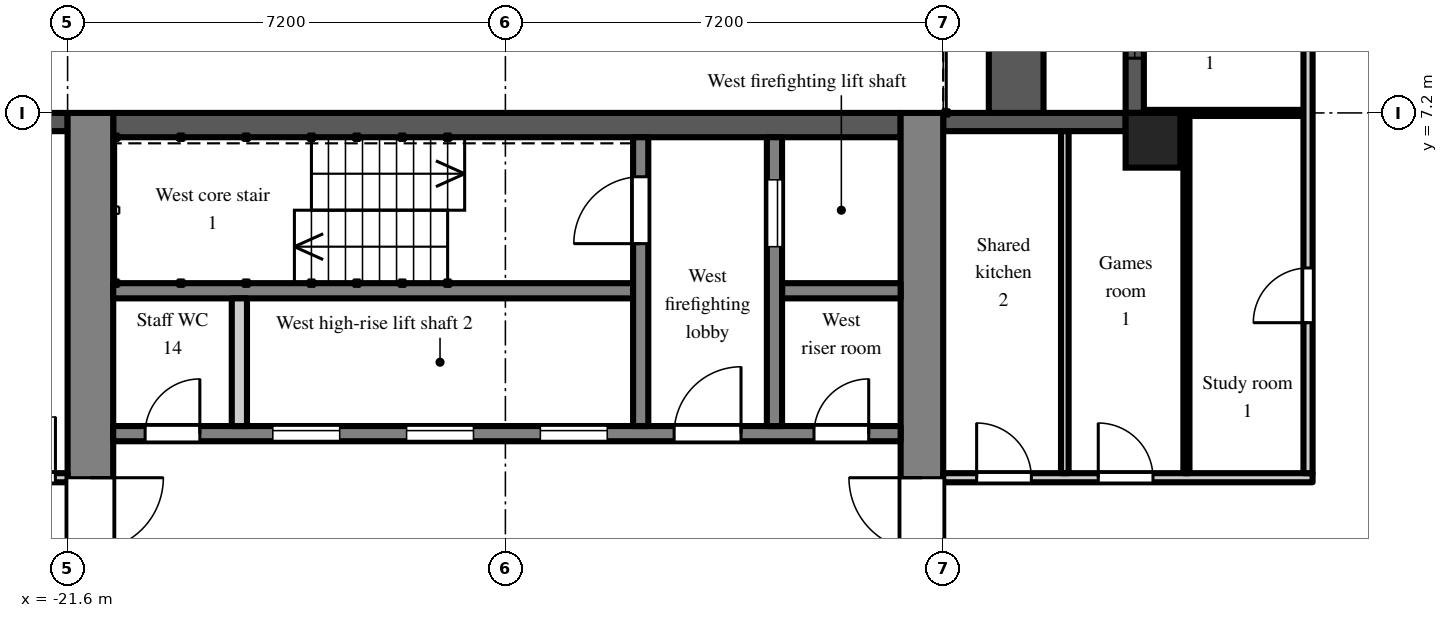
"""IFC4 building model, lengths in metres.
Left out: names, types, materials, properties, quantities, classifications, styles, units other than length and angle.
Written with IfcOpenShell. Run it as: python <this file> out.ifc"""

import sys

from ifc_helpers import new_model, si_unit, direction, frame, frame_2d, origin, origin_2d, place, context, subcontext, project, spatial, rectangle, extrude, element, fill, save


model = new_model("IFC4")
c1 = context("Model", 3, precision=1e-05, world=origin(), true_north=direction((0.0, 1.0)))
c2 = subcontext(c1, "Body", "Model", "MODEL_VIEW")
j1 = project(units=[si_unit("LENGTHUNIT", "METRE"), si_unit("PLANEANGLEUNIT", "RADIAN")], contexts=[c1])
p1 = place(None, origin())
s1 = spatial("IfcSite", under=j1, at=p1, CompositionType="ELEMENT")
p2 = place(p1, origin())
s2 = spatial("IfcBuilding", under=s1, at=p2, CompositionType="ELEMENT")
p3 = place(p2, frame((0.0, 0.0, 201.9)))
s3 = spatial("IfcBuildingStorey", under=s2, at=p3, CompositionType="ELEMENT", Elevation=201.9)
p4 = place(p3, frame((-3.75, 6.75, 0.0), z_axis=(0.0, 0.0, 1.0), x_axis=(1.0, 0.0, 0.0)))
e1 = element("IfcColumn", 1, at=p4, inside=s3, PredefinedType="COLUMN", context=c2, shape_type="SweptSolid", body=[
    extrude(rectangle(XDim=0.9, YDim=0.9, at=origin_2d()), origin(), (0.0, 0.0, 1.0), 3.0),
])
p5 = place(p3, frame((-4.05, 14.4, 0.0), z_axis=(0.0, 0.0, 1.0), x_axis=(0.0, -1.0, 0.0)))
e2 = element("IfcWall", 2, at=p5, inside=s3, PredefinedType="SOLIDWALL", context=c2, shape_type="SweptSolid", body=[
    extrude(rectangle(XDim=7.2, YDim=0.3, at=frame_2d((3.6, 0.0))), origin(), (0.0, 0.0, 1.0), 2.3),
])
p6 = place(p5, frame((3.0, 0.0, 0.0)))
e3 = element("IfcOpeningElement", 3, at=p6, cuts=e2, PredefinedType="OPENING", context=c2, shape_type="SweptSolid", body=[
    extrude(rectangle(XDim=1.2, YDim=2.05, at=frame_2d((0.6, 1.025))), frame((0.0, 0.16, 0.0), z_axis=(0.0, -1.0, 0.0), x_axis=(1.0, 0.0, 0.0)), (0.0, 0.0, 1.0), 0.32),
])
p7 = place(p5, frame((0.9, 0.0, 0.2)))
e4 = element("IfcOpeningElement", 4, at=p7, cuts=e2, PredefinedType="OPENING", context=c2, shape_type="SweptSolid", body=[
    extrude(rectangle(XDim=1.8, YDim=1.85, at=frame_2d((0.9, 0.925))), frame((0.0, 0.16, 0.0), z_axis=(0.0, -1.0, 0.0), x_axis=(1.0, 0.0, 0.0)), (0.0, 0.0, 1.0), 0.32),
])
p8 = place(p5, frame((4.5, 0.0, 0.2)))
e5 = element("IfcOpeningElement", 5, at=p8, cuts=e2, PredefinedType="OPENING", context=c2, shape_type="SweptSolid", body=[
    extrude(rectangle(XDim=1.8, YDim=1.85, at=frame_2d((0.9, 0.925))), frame((0.0, 0.16, 0.0), z_axis=(0.0, -1.0, 0.0), x_axis=(1.0, 0.0, 0.0)), (0.0, 0.0, 1.0), 0.32),
])
p9 = place(p3, frame((-4.2, 7.05, 0.0), z_axis=(0.0, 0.0, 1.0), x_axis=(-1.0, 0.0, 0.0)))
e6 = element("IfcWall", 6, at=p9, inside=s3, PredefinedType="SOLIDWALL", context=c2, shape_type="SweptSolid", body=[
    extrude(rectangle(XDim=3.0, YDim=0.3, at=frame_2d((1.5, 0.0))), origin(), (0.0, 0.0, 1.0), 2.3),
])
p10 = place(p3, frame((-21.6, 7.05, 0.0), z_axis=(0.0, 0.0, 1.0), x_axis=(-1.0, 0.0, 0.0)))
e7 = element("IfcWall", 7, at=p10, inside=s3, PredefinedType="SOLIDWALL", context=c2, shape_type="SweptSolid", body=[
    extrude(rectangle(XDim=2.7, YDim=0.3, at=frame_2d((1.35, 0.0))), origin(), (0.0, 0.0, 1.0), 2.3),
])
p11 = place(p10, frame((0.75, 0.0, 0.2)))
e8 = element("IfcOpeningElement", 8, at=p11, cuts=e7, PredefinedType="OPENING", context=c2, shape_type="SweptSolid", body=[
    extrude(rectangle(XDim=1.2, YDim=1.85, at=frame_2d((0.6, 0.925))), frame((0.0, 0.16, 0.0), z_axis=(0.0, -1.0, 0.0), x_axis=(1.0, 0.0, 0.0)), (0.0, 0.0, 1.0), 0.32),
])
p12 = place(p3, frame((-6.0, 7.2, 0.0), z_axis=(0.0, 0.0, 1.0), x_axis=(0.0, 1.0, 0.0)))
e9 = element("IfcWall", 9, at=p12, inside=s3, PredefinedType="PARAPET", context=c2, shape_type="SweptSolid", body=[
    extrude(rectangle(XDim=7.2, YDim=0.9, at=frame_2d((3.6, 0.0))), origin(), (0.0, 0.0, 1.0), 0.8),
])
p13 = place(p3, frame((-7.55, -7.2, 0.0), z_axis=(0.0, 0.0, 1.0), x_axis=(0.0, 1.0, 0.0)))
e10 = element("IfcWall", 10, at=p13, inside=s3, PredefinedType="SHEAR", context=c2, shape_type="SweptSolid", body=[
    extrude(rectangle(XDim=14.4, YDim=0.7, at=frame_2d((7.2, 0.0))), origin(), (0.0, 0.0, 1.0), 2.6),
])
p14 = place(p13, frame((6.0, 0.0, 0.0)))
e11 = element("IfcOpeningElement", 11, at=p14, cuts=e10, PredefinedType="OPENING", context=c2, shape_type="SweptSolid", body=[
    extrude(rectangle(XDim=2.4, YDim=2.2, at=frame_2d((1.2, 1.1))), frame((0.0, 0.36, 0.0), z_axis=(0.0, -1.0, 0.0), x_axis=(1.0, 0.0, 0.0)), (0.0, 0.0, 1.0), 0.72),
])
p15 = place(p3, frame((-21.225, -7.2, 0.0), z_axis=(0.0, 0.0, 1.0), x_axis=(0.0, 1.0, 0.0)))
e12 = element("IfcWall", 12, at=p15, inside=s3, PredefinedType="SHEAR", context=c2, shape_type="SweptSolid", body=[
    extrude(rectangle(XDim=14.4, YDim=0.75, at=frame_2d((7.2, 0.0))), origin(), (0.0, 0.0, 1.0), 2.6),
])
p16 = place(p15, frame((6.0, 0.0, 0.0)))
e13 = element("IfcOpeningElement", 13, at=p16, cuts=e12, PredefinedType="OPENING", context=c2, shape_type="SweptSolid", body=[
    extrude(rectangle(XDim=2.4, YDim=2.2, at=frame_2d((1.2, 1.1))), frame((0.0, 0.385, 0.0), z_axis=(0.0, -1.0, 0.0), x_axis=(1.0, 0.0, 0.0)), (0.0, 0.0, 1.0), 0.77),
])
p17 = place(p3, frame((-7.9, 7.0, 0.0), z_axis=(0.0, 0.0, 1.0), x_axis=(-1.0, 0.0, 0.0)))
e14 = element("IfcWall", 14, at=p17, inside=s3, PredefinedType="SHEAR", context=c2, shape_type="SweptSolid", body=[
    extrude(rectangle(XDim=12.95, YDim=0.4, at=frame_2d((6.475, 0.0))), origin(), (0.0, 0.0, 1.0), 2.6),
])
p18 = place(p3, frame((-7.9, 1.925, 0.0), z_axis=(0.0, 0.0, 1.0), x_axis=(-1.0, 0.0, 0.0)))
e15 = element("IfcWall", 15, at=p18, inside=s3, PredefinedType="SHEAR", context=c2, shape_type="SweptSolid", body=[
    extrude(rectangle(XDim=12.95, YDim=0.25, at=frame_2d((6.475, 0.0))), origin(), (0.0, 0.0, 1.0), 2.6),
])
p19 = place(p18, frame((4.825, 0.0, 0.0)))
e16 = element("IfcOpeningElement", 16, at=p19, cuts=e15, PredefinedType="OPENING", context=c2, shape_type="SweptSolid", body=[
    extrude(rectangle(XDim=1.1, YDim=2.1, at=frame_2d((0.55, 1.05))), frame((0.0, 0.135, 0.0), z_axis=(0.0, -1.0, 0.0), x_axis=(1.0, 0.0, 0.0)), (0.0, 0.0, 1.0), 0.27),
])
p20 = place(p18, frame((7.025, 0.0, 0.0)))
e17 = element("IfcOpeningElement", 17, at=p20, cuts=e15, PredefinedType="OPENING", context=c2, shape_type="SweptSolid", body=[
    extrude(rectangle(XDim=1.1, YDim=2.1, at=frame_2d((0.55, 1.05))), frame((0.0, 0.135, 0.0), z_axis=(0.0, -1.0, 0.0), x_axis=(1.0, 0.0, 0.0)), (0.0, 0.0, 1.0), 0.27),
])
p21 = place(p18, frame((9.225, 0.0, 0.0)))
e18 = element("IfcOpeningElement", 18, at=p21, cuts=e15, PredefinedType="OPENING", context=c2, shape_type="SweptSolid", body=[
    extrude(rectangle(XDim=1.1, YDim=2.1, at=frame_2d((0.55, 1.05))), frame((0.0, 0.135, 0.0), z_axis=(0.0, -1.0, 0.0), x_axis=(1.0, 0.0, 0.0)), (0.0, 0.0, 1.0), 0.27),
])
p22 = place(p18, frame((0.525, 0.0, 0.0)))
e19 = element("IfcOpeningElement", 19, at=p22, cuts=e15, PredefinedType="OPENING", context=c2, shape_type="SweptSolid", body=[
    extrude(rectangle(XDim=0.9, YDim=2.1, at=frame_2d((0.45, 1.05))), frame((0.0, 0.135, 0.0), z_axis=(0.0, -1.0, 0.0), x_axis=(1.0, 0.0, 0.0)), (0.0, 0.0, 1.0), 0.27),
])
p23 = place(p18, frame((2.625, 0.0, 0.0)))
e20 = element("IfcOpeningElement", 20, at=p23, cuts=e15, PredefinedType="OPENING", context=c2, shape_type="SweptSolid", body=[
    extrude(rectangle(XDim=1.1, YDim=2.1, at=frame_2d((0.55, 1.05))), frame((0.0, 0.135, 0.0), z_axis=(0.0, -1.0, 0.0), x_axis=(1.0, 0.0, 0.0)), (0.0, 0.0, 1.0), 0.27),
])
p24 = place(p18, frame((11.525, 0.0, 0.0)))
e21 = element("IfcOpeningElement", 21, at=p24, cuts=e15, PredefinedType="OPENING", context=c2, shape_type="SweptSolid", body=[
    extrude(rectangle(XDim=0.9, YDim=2.1, at=frame_2d((0.45, 1.05))), frame((0.0, 0.135, 0.0), z_axis=(0.0, -1.0, 0.0), x_axis=(1.0, 0.0, 0.0)), (0.0, 0.0, 1.0), 0.27),
])
p25 = place(p3, frame((-7.9, 4.275, 0.0), z_axis=(0.0, 0.0, 1.0), x_axis=(-1.0, 0.0, 0.0)))
e22 = element("IfcWall", 22, at=p25, inside=s3, PredefinedType="SHEAR", context=c2, shape_type="SweptSolid", body=[
    extrude(rectangle(XDim=1.95, YDim=0.25, at=frame_2d((0.975, 0.0))), origin(), (0.0, 0.0, 1.0), 2.6),
])
p26 = place(p3, frame((-12.3, 4.275, 0.0), z_axis=(0.0, 0.0, 1.0), x_axis=(-1.0, 0.0, 0.0)))
e23 = element("IfcWall", 23, at=p26, inside=s3, PredefinedType="SHEAR", context=c2, shape_type="SweptSolid", body=[
    extrude(rectangle(XDim=8.55, YDim=0.25, at=frame_2d((4.275, 0.0))), origin(), (0.0, 0.0, 1.0), 2.6),
])
p27 = place(p3, frame((-9.975, 2.05, 0.0), z_axis=(0.0, 0.0, 1.0), x_axis=(0.0, 1.0, 0.0)))
e24 = element("IfcWall", 24, at=p27, inside=s3, PredefinedType="SHEAR", context=c2, shape_type="SweptSolid", body=[
    extrude(rectangle(XDim=4.75, YDim=0.25, at=frame_2d((2.375, 0.0))), origin(), (0.0, 0.0, 1.0), 2.6),
])
p28 = place(p27, frame((2.95, 0.0, 0.0)))
e25 = element("IfcOpeningElement", 25, at=p28, cuts=e24, PredefinedType="OPENING", context=c2, shape_type="SweptSolid", body=[
    extrude(rectangle(XDim=1.1, YDim=2.1, at=frame_2d((0.55, 1.05))), frame((0.0, 0.135, 0.0), z_axis=(0.0, -1.0, 0.0), x_axis=(1.0, 0.0, 0.0)), (0.0, 0.0, 1.0), 0.27),
])
p29 = place(p3, frame((-12.175, 2.05, 0.0), z_axis=(0.0, 0.0, 1.0), x_axis=(0.0, 1.0, 0.0)))
e26 = element("IfcWall", 26, at=p29, inside=s3, PredefinedType="SHEAR", context=c2, shape_type="SweptSolid", body=[
    extrude(rectangle(XDim=4.75, YDim=0.25, at=frame_2d((2.375, 0.0))), origin(), (0.0, 0.0, 1.0), 2.6),
])
p30 = place(p29, frame((3.0, 0.0, 0.0)))
e27 = element("IfcOpeningElement", 27, at=p30, cuts=e26, PredefinedType="OPENING", context=c2, shape_type="SweptSolid", body=[
    extrude(rectangle(XDim=1.1, YDim=2.1, at=frame_2d((0.55, 1.05))), frame((0.0, 0.135, 0.0), z_axis=(0.0, -1.0, 0.0), x_axis=(1.0, 0.0, 0.0)), (0.0, 0.0, 1.0), 0.27),
])
p31 = place(p3, frame((-18.775, 2.05, 0.0), z_axis=(0.0, 0.0, 1.0), x_axis=(0.0, 1.0, 0.0)))
e28 = element("IfcWall", 28, at=p31, inside=s3, PredefinedType="PARTITIONING", context=c2, shape_type="SweptSolid", body=[
    extrude(rectangle(XDim=2.1, YDim=0.25, at=frame_2d((1.05, 0.0))), origin(), (0.0, 0.0, 1.0), 2.6),
])
p32 = place(p3, frame((-25.125, 1.2, 0.0), z_axis=(0.0, 0.0, 1.0), x_axis=(1.0, 0.0, 0.0)))
e29 = element("IfcWall", 29, at=p32, inside=s3, PredefinedType="PARTITIONING", context=c2, shape_type="SweptSolid", body=[
    extrude(rectangle(XDim=3.525, YDim=0.15, at=frame_2d((1.762, 0.0))), origin(), (0.0, 0.0, 1.0), 2.6),
])
p33 = place(p32, frame((2.325, 0.0, 0.0)))
e30 = element("IfcOpeningElement", 30, at=p33, cuts=e29, PredefinedType="OPENING", context=c2, shape_type="SweptSolid", body=[
    extrude(rectangle(XDim=1.0, YDim=2.1, at=frame_2d((0.5, 1.05))), frame((0.0, 0.085, 0.0), z_axis=(0.0, -1.0, 0.0), x_axis=(1.0, 0.0, 0.0)), (0.0, 0.0, 1.0), 0.17),
])
p34 = place(p3, frame((-7.2, 1.2, 0.0), z_axis=(0.0, 0.0, 1.0), x_axis=(1.0, 0.0, 0.0)))
e31 = element("IfcWall", 31, at=p34, inside=s3, PredefinedType="PARTITIONING", context=c2, shape_type="SweptSolid", body=[
    extrude(rectangle(XDim=6.075, YDim=0.15, at=frame_2d((3.038, 0.0))), origin(), (0.0, 0.0, 1.0), 2.6),
])
p35 = place(p34, frame((2.55, 0.0, 0.0)))
e32 = element("IfcOpeningElement", 32, at=p35, cuts=e31, PredefinedType="OPENING", context=c2, shape_type="SweptSolid", body=[
    extrude(rectangle(XDim=0.9, YDim=2.1, at=frame_2d((0.45, 1.05))), frame((0.0, 0.085, 0.0), z_axis=(0.0, -1.0, 0.0), x_axis=(1.0, 0.0, 0.0)), (0.0, 0.0, 1.0), 0.17),
])
p36 = place(p34, frame((0.55, 0.0, 0.0)))
e33 = element("IfcOpeningElement", 33, at=p36, cuts=e31, PredefinedType="OPENING", context=c2, shape_type="SweptSolid", body=[
    extrude(rectangle(XDim=0.9, YDim=2.1, at=frame_2d((0.45, 1.05))), frame((0.0, 0.085, 0.0), z_axis=(0.0, -1.0, 0.0), x_axis=(1.0, 0.0, 0.0)), (0.0, 0.0, 1.0), 0.17),
])
p37 = place(p3, frame((-5.2, 1.275, 0.0), z_axis=(0.0, 0.0, 1.0), x_axis=(0.0, 1.0, 0.0)))
e34 = element("IfcWall", 34, at=p37, inside=s3, PredefinedType="PARTITIONING", context=c2, shape_type="SweptSolid", body=[
    extrude(rectangle(XDim=5.625, YDim=0.125, at=frame_2d((2.812, 0.0))), origin(), (0.0, 0.0, 1.0), 2.6),
])
p38 = place(p3, frame((-3.9, 7.2, 0.0), z_axis=(0.0, 0.0, 1.0), x_axis=(1.0, 0.0, 0.0)))
e35 = element("IfcWall", 35, at=p38, inside=s3, PredefinedType="PARTITIONING", context=c2, shape_type="SweptSolid", body=[
    extrude(rectangle(XDim=2.625, YDim=0.1, at=frame_2d((1.312, 0.0))), origin(), (0.0, 0.0, 1.0), 2.6),
])
p39 = place(p3, frame((-3.2, 1.275, 0.0), z_axis=(0.0, 0.0, 1.0), x_axis=(0.0, 1.0, 0.0)))
e36 = element("IfcWall", 36, at=p39, inside=s3, PredefinedType="PARTITIONING", context=c2, shape_type="SweptSolid", body=[
    extrude(rectangle(XDim=5.875, YDim=0.1, at=frame_2d((2.938, 0.0))), origin(), (0.0, 0.0, 1.0), 2.6),
])
p40 = place(p3, frame((-1.2, 1.275, 0.0), z_axis=(0.0, 0.0, 1.0), x_axis=(0.0, 1.0, 0.0)))
e37 = element("IfcWall", 37, at=p40, inside=s3, PredefinedType="PARTITIONING", context=c2, shape_type="SweptSolid", body=[
    extrude(rectangle(XDim=16.65, YDim=0.15, at=frame_2d((8.325, 0.0))), origin(), (0.0, 0.0, 1.0), 2.6),
])
p41 = place(p40, frame((2.475, 0.0, 0.0)))
e38 = element("IfcOpeningElement", 38, at=p41, cuts=e37, PredefinedType="OPENING", context=c2, shape_type="SweptSolid", body=[
    extrude(rectangle(XDim=0.9, YDim=2.1, at=frame_2d((0.45, 1.05))), frame((0.0, 0.085, 0.0), z_axis=(0.0, -1.0, 0.0), x_axis=(1.0, 0.0, 0.0)), (0.0, 0.0, 1.0), 0.17),
])
p42 = place(p40, frame((10.875, 0.0, 0.0)))
e39 = element("IfcOpeningElement", 39, at=p42, cuts=e37, PredefinedType="OPENING", context=c2, shape_type="SweptSolid", body=[
    extrude(rectangle(XDim=0.9, YDim=2.1, at=frame_2d((0.45, 1.05))), frame((0.0, 0.085, 0.0), z_axis=(0.0, -1.0, 0.0), x_axis=(1.0, 0.0, 0.0)), (0.0, 0.0, 1.0), 0.17),
])
p43 = place(p40, frame((13.725, 0.0, 0.0)))
e40 = element("IfcOpeningElement", 40, at=p43, cuts=e37, PredefinedType="OPENING", context=c2, shape_type="SweptSolid", body=[
    extrude(rectangle(XDim=1.0, YDim=2.1, at=frame_2d((0.5, 1.05))), frame((0.0, 0.085, 0.0), z_axis=(0.0, -1.0, 0.0), x_axis=(1.0, 0.0, 0.0)), (0.0, 0.0, 1.0), 0.17),
])
p44 = place(p8, origin())
e41 = element("IfcWindow", 41, at=p44, inside=s3, PartitioningType="SINGLE_PANEL", PredefinedType="WINDOW", context=c2, shape_type="SweptSolid", body=[
    extrude(rectangle(XDim=1.8, YDim=1.85, at=frame_2d((0.9, 0.925))), frame((0.0, 0.03, 0.0), z_axis=(0.0, -1.0, 0.0), x_axis=(1.0, 0.0, 0.0)), (0.0, 0.0, 1.0), 0.06),
])
fill(e5, e41)
p45 = place(p19, origin())
e42 = element("IfcDoor", 42, at=p45, inside=s3, OperationType="SLIDING_TO_LEFT", PredefinedType="DOOR", context=c2, shape_type="SweptSolid", body=[
    extrude(rectangle(XDim=1.1, YDim=2.1, at=frame_2d((0.55, 1.05))), frame((0.0, 0.025, 0.0), z_axis=(0.0, -1.0, 0.0), x_axis=(1.0, 0.0, 0.0)), (0.0, 0.0, 1.0), 0.05),
])
fill(e16, e42)
p46 = place(p20, origin())
e43 = element("IfcDoor", 43, at=p46, inside=s3, OperationType="SLIDING_TO_LEFT", PredefinedType="DOOR", context=c2, shape_type="SweptSolid", body=[
    extrude(rectangle(XDim=1.1, YDim=2.1, at=frame_2d((0.55, 1.05))), frame((0.0, 0.025, 0.0), z_axis=(0.0, -1.0, 0.0), x_axis=(1.0, 0.0, 0.0)), (0.0, 0.0, 1.0), 0.05),
])
fill(e17, e43)
p47 = place(p21, origin())
e44 = element("IfcDoor", 44, at=p47, inside=s3, OperationType="SLIDING_TO_LEFT", PredefinedType="DOOR", context=c2, shape_type="SweptSolid", body=[
    extrude(rectangle(XDim=1.1, YDim=2.1, at=frame_2d((0.55, 1.05))), frame((0.0, 0.025, 0.0), z_axis=(0.0, -1.0, 0.0), x_axis=(1.0, 0.0, 0.0)), (0.0, 0.0, 1.0), 0.05),
])
fill(e18, e44)
p48 = place(p28, origin())
e45 = element("IfcDoor", 45, at=p48, inside=s3, OperationType="SLIDING_TO_LEFT", PredefinedType="DOOR", context=c2, shape_type="SweptSolid", body=[
    extrude(rectangle(XDim=1.1, YDim=2.1, at=frame_2d((0.55, 1.05))), frame((0.0, 0.025, 0.0), z_axis=(0.0, -1.0, 0.0), x_axis=(1.0, 0.0, 0.0)), (0.0, 0.0, 1.0), 0.05),
])
fill(e25, e45)
p49 = place(p30, origin())
e46 = element("IfcDoor", 46, at=p49, inside=s3, OperationType="SINGLE_SWING_LEFT", PredefinedType="DOOR", context=c2, shape_type="SweptSolid", body=[
    extrude(rectangle(XDim=1.1, YDim=2.1, at=frame_2d((0.55, 1.05))), frame((0.0, 0.025, 0.0), z_axis=(0.0, -1.0, 0.0), x_axis=(1.0, 0.0, 0.0)), (0.0, 0.0, 1.0), 0.05),
])
fill(e27, e46)
p50 = place(p22, frame((0.9, 0.0, 0.0), z_axis=(0.0, 0.0, 1.0), x_axis=(-1.0, 0.0, 0.0)))
e47 = element("IfcDoor", 47, at=p50, inside=s3, OperationType="SINGLE_SWING_RIGHT", PredefinedType="DOOR", context=c2, shape_type="SweptSolid", body=[
    extrude(rectangle(XDim=0.9, YDim=2.1, at=frame_2d((0.45, 1.05))), frame((0.0, 0.025, 0.0), z_axis=(0.0, -1.0, 0.0), x_axis=(1.0, 0.0, 0.0)), (0.0, 0.0, 1.0), 0.05),
])
fill(e19, e47)
p51 = place(p23, frame((1.1, 0.0, 0.0), z_axis=(0.0, 0.0, 1.0), x_axis=(-1.0, 0.0, 0.0)))
e48 = element("IfcDoor", 48, at=p51, inside=s3, OperationType="SINGLE_SWING_RIGHT", PredefinedType="DOOR", context=c2, shape_type="SweptSolid", body=[
    extrude(rectangle(XDim=1.1, YDim=2.1, at=frame_2d((0.55, 1.05))), frame((0.0, 0.025, 0.0), z_axis=(0.0, -1.0, 0.0), x_axis=(1.0, 0.0, 0.0)), (0.0, 0.0, 1.0), 0.05),
])
fill(e20, e48)
p52 = place(p14, origin())
e49 = element("IfcDoor", 49, at=p52, inside=s3, OperationType="DOUBLE_DOOR_DOUBLE_SWING", PredefinedType="DOOR", context=c2, shape_type="SweptSolid", body=[
    extrude(rectangle(XDim=2.4, YDim=2.2, at=frame_2d((1.2, 1.1))), frame((0.0, 0.025, 0.0), z_axis=(0.0, -1.0, 0.0), x_axis=(1.0, 0.0, 0.0)), (0.0, 0.0, 1.0), 0.05),
])
fill(e11, e49)
p53 = place(p16, frame((2.4, 0.0, 0.0), z_axis=(0.0, 0.0, 1.0), x_axis=(-1.0, 0.0, 0.0)))
e50 = element("IfcDoor", 50, at=p53, inside=s3, OperationType="DOUBLE_DOOR_DOUBLE_SWING", PredefinedType="DOOR", context=c2, shape_type="SweptSolid", body=[
    extrude(rectangle(XDim=2.4, YDim=2.2, at=frame_2d((1.2, 1.1))), frame((0.0, 0.025, 0.0), z_axis=(0.0, -1.0, 0.0), x_axis=(1.0, 0.0, 0.0)), (0.0, 0.0, 1.0), 0.05),
])
fill(e13, e50)
p54 = place(p24, frame((0.9, 0.0, 0.0), z_axis=(0.0, 0.0, 1.0), x_axis=(-1.0, 0.0, 0.0)))
e51 = element("IfcDoor", 51, at=p54, inside=s3, OperationType="SINGLE_SWING_RIGHT", PredefinedType="DOOR", context=c2, shape_type="SweptSolid", body=[
    extrude(rectangle(XDim=0.9, YDim=2.1, at=frame_2d((0.45, 1.05))), frame((0.0, 0.025, 0.0), z_axis=(0.0, -1.0, 0.0), x_axis=(1.0, 0.0, 0.0)), (0.0, 0.0, 1.0), 0.05),
])
fill(e21, e51)
p55 = place(p41, origin())
e52 = element("IfcDoor", 52, at=p55, inside=s3, OperationType="SINGLE_SWING_LEFT", PredefinedType="DOOR", context=c2, shape_type="SweptSolid", body=[
    extrude(rectangle(XDim=0.9, YDim=2.1, at=frame_2d((0.45, 1.05))), frame((0.0, 0.025, 0.0), z_axis=(0.0, -1.0, 0.0), x_axis=(1.0, 0.0, 0.0)), (0.0, 0.0, 1.0), 0.05),
])
fill(e38, e52)
p56 = place(p35, origin())
e53 = element("IfcDoor", 53, at=p56, inside=s3, OperationType="SINGLE_SWING_LEFT", PredefinedType="DOOR", context=c2, shape_type="SweptSolid", body=[
    extrude(rectangle(XDim=0.9, YDim=2.1, at=frame_2d((0.45, 1.05))), frame((0.0, 0.025, 0.0), z_axis=(0.0, -1.0, 0.0), x_axis=(1.0, 0.0, 0.0)), (0.0, 0.0, 1.0), 0.05),
])
fill(e32, e53)
p57 = place(p36, origin())
e54 = element("IfcDoor", 54, at=p57, inside=s3, OperationType="SINGLE_SWING_LEFT", PredefinedType="DOOR", context=c2, shape_type="SweptSolid", body=[
    extrude(rectangle(XDim=0.9, YDim=2.1, at=frame_2d((0.45, 1.05))), frame((0.0, 0.025, 0.0), z_axis=(0.0, -1.0, 0.0), x_axis=(1.0, 0.0, 0.0)), (0.0, 0.0, 1.0), 0.05),
])
fill(e33, e54)
p58 = place(p33, origin())
e55 = element("IfcDoor", 55, at=p58, inside=s3, OperationType="SINGLE_SWING_RIGHT", PredefinedType="DOOR", context=c2, shape_type="SweptSolid", body=[
    extrude(rectangle(XDim=1.0, YDim=2.1, at=frame_2d((0.5, 1.05))), frame((0.0, 0.025, 0.0), z_axis=(0.0, -1.0, 0.0), x_axis=(1.0, 0.0, 0.0)), (0.0, 0.0, 1.0), 0.05),
])
fill(e30, e55)
save(model, sys.argv[1])
